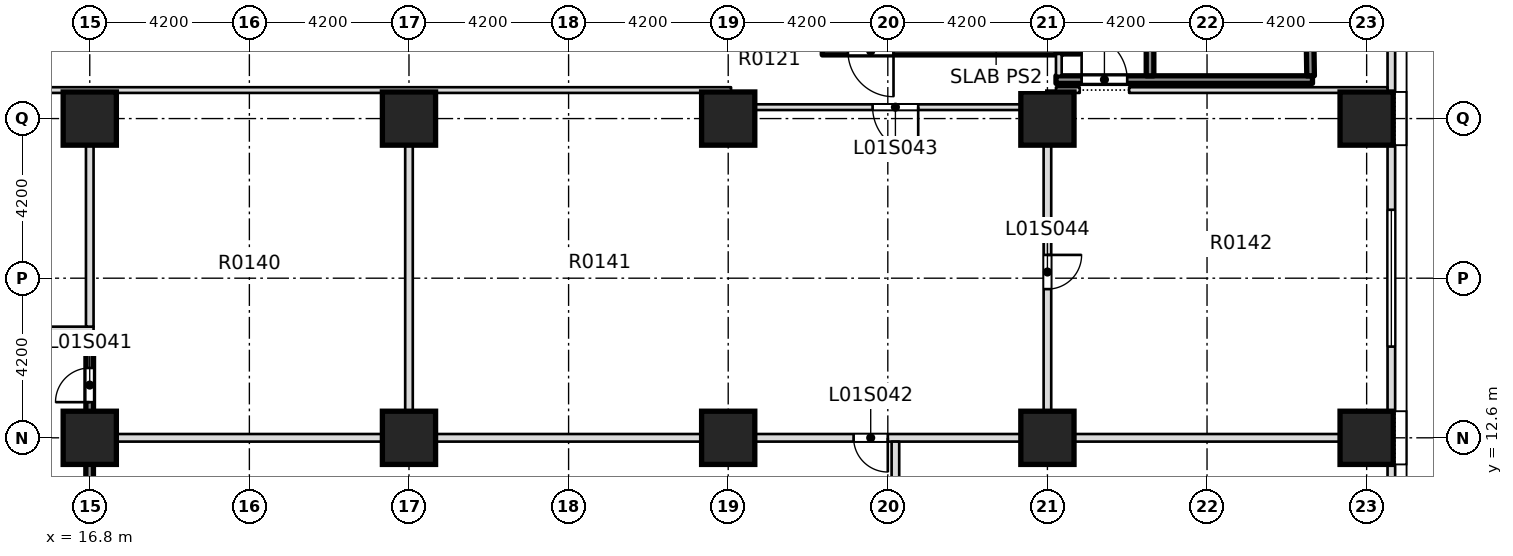
"""IFC4 building model, lengths in metres.
Left out: names, types, materials, properties, quantities, classifications, styles, units other than length and angle.
Written with IfcOpenShell. Run it as: python <this file> out.ifc"""

import sys

from ifc_helpers import new_model, si_unit, direction, frame, frame_2d, origin, origin_2d, place, context, subcontext, project, spatial, rectangle, extrude, element, fill, save


model = new_model("IFC4")
c1 = context("Model", 3, precision=1e-05, world=origin(), true_north=direction((0.0, 1.0)))
c2 = subcontext(c1, "Body", "Model", "MODEL_VIEW")
j1 = project(units=[si_unit("LENGTHUNIT", "METRE"), si_unit("PLANEANGLEUNIT", "RADIAN")], contexts=[c1])
p1 = place(None, origin())
s1 = spatial("IfcSite", under=j1, at=p1, CompositionType="ELEMENT")
p2 = place(p1, origin())
s2 = spatial("IfcBuilding", under=s1, at=p2, CompositionType="ELEMENT")
p3 = place(p2, frame((0.0, 0.0, 7.5)))
s3 = spatial("IfcBuildingStorey", under=s2, at=p3, CompositionType="ELEMENT", Elevation=7.5)
for number, where, z_axis, x_axis in (
    (1, (16.8, 12.6, -0.4), (0.0, 0.0, 1.0), (1.0, 0.0, 0.0)),
    (2, (25.2, 12.6, -0.4), (0.0, 0.0, 1.0), (1.0, 0.0, 0.0)),
    (3, (16.8, 21.0, -0.4), (0.0, 0.0, 1.0), (1.0, 0.0, 0.0)),
):
    element("IfcColumn", number, at=place(p3, frame(where, z_axis=z_axis, x_axis=x_axis)), inside=s3, PredefinedType="COLUMN", context=c2, shape_type="SweptSolid", body=[
        extrude(rectangle(XDim=1.4, YDim=1.4, at=origin_2d()), origin(), (0.0, 0.0, 1.0), 5.0),
    ])
for number, where, z_axis, x_axis in (
    (4, (33.6, 12.6, 0.0), (0.0, 0.0, 1.0), (1.0, 0.0, 0.0)),
    (5, (42.0, 12.6, 0.0), (0.0, 0.0, 1.0), (1.0, 0.0, 0.0)),
):
    element("IfcColumn", number, at=place(p3, frame(where, z_axis=z_axis, x_axis=x_axis)), inside=s3, PredefinedType="COLUMN", context=c2, shape_type="SweptSolid", body=[
        extrude(rectangle(XDim=1.4, YDim=1.4, at=origin_2d()), origin(), (0.0, 0.0, 1.0), 4.6),
    ])
for number, where, z_axis, x_axis in (
    (6, (50.4, 12.6, 0.0), (0.0, 0.0, 1.0), (1.0, 0.0, 0.0)),
    (7, (25.2, 21.0, 0.0), (0.0, 0.0, 1.0), (1.0, 0.0, 0.0)),
):
    element("IfcColumn", number, at=place(p3, frame(where, z_axis=z_axis, x_axis=x_axis)), inside=s3, PredefinedType="COLUMN", context=c2, shape_type="SweptSolid", body=[
        extrude(rectangle(XDim=1.4, YDim=1.4, at=origin_2d()), origin(), (0.0, 0.0, 1.0), 5.0),
    ])
for number, where, z_axis, x_axis in (
    (8, (33.6, 21.0, 0.0), (0.0, 0.0, 1.0), (1.0, 0.0, 0.0)),
    (9, (42.0, 21.0, 0.0), (0.0, 0.0, 1.0), (1.0, 0.0, 0.0)),
):
    element("IfcColumn", number, at=place(p3, frame(where, z_axis=z_axis, x_axis=x_axis)), inside=s3, PredefinedType="COLUMN", context=c2, shape_type="SweptSolid", body=[
        extrude(rectangle(XDim=1.4, YDim=1.4, at=origin_2d()), origin(), (0.0, 0.0, 1.0), 4.6),
    ])
p4 = place(p3, frame((50.4, 21.0, 0.0), z_axis=(0.0, 0.0, 1.0), x_axis=(1.0, 0.0, 0.0)))
e10 = element("IfcColumn", 10, at=p4, inside=s3, PredefinedType="COLUMN", context=c2, shape_type="SweptSolid", body=[
    extrude(rectangle(XDim=1.4, YDim=1.4, at=origin_2d()), origin(), (0.0, 0.0, 1.0), 5.0),
])
p5 = place(p3, frame((16.875, 12.6, 0.0), z_axis=(0.0, 0.0, 1.0), x_axis=(1.0, 0.0, 0.0)))
e11 = element("IfcWall", 11, at=p5, inside=s3, PredefinedType="PARTITIONING", context=c2, shape_type="SweptSolid", body=[
    extrude(rectangle(XDim=34.075, YDim=0.2, at=frame_2d((17.038, 0.0))), origin(), (0.0, 0.0, 1.0), 4.6),
])
p6 = place(p5, frame((20.025, 0.0, 0.0)))
e12 = element("IfcOpeningElement", 12, at=p6, cuts=e11, PredefinedType="OPENING", context=c2, shape_type="SweptSolid", body=[
    extrude(rectangle(XDim=0.9, YDim=2.1, at=frame_2d((0.45, 1.05))), frame((0.0, 0.11, 0.0), z_axis=(0.0, -1.0, 0.0), x_axis=(1.0, 0.0, 0.0)), (0.0, 0.0, 1.0), 0.22),
])
p7 = place(p3, frame((12.601, 15.45, 0.0), z_axis=(0.0, 0.0, 1.0), x_axis=(1.0, 0.0, 0.0)))
e13 = element("IfcWall", 13, at=p7, inside=s3, PredefinedType="PARTITIONING", context=c2, shape_type="SweptSolid", body=[
    extrude(rectangle(XDim=4.299, YDim=0.15, at=frame_2d((2.149, 0.0))), origin(), (0.0, 0.0, 1.0), 4.6),
])
p8 = place(p7, frame((1.549, 0.0, 0.0)))
e14 = element("IfcOpeningElement", 14, at=p8, cuts=e13, PredefinedType="OPENING", context=c2, shape_type="SweptSolid", body=[
    extrude(rectangle(XDim=1.1, YDim=2.1, at=frame_2d((0.55, 1.05))), frame((0.0, 0.085, 0.0), z_axis=(0.0, -1.0, 0.0), x_axis=(1.0, 0.0, 0.0)), (0.0, 0.0, 1.0), 0.17),
])
p9 = place(p3, frame((33.525, 21.3, 0.0), z_axis=(0.0, 0.0, 1.0), x_axis=(1.0, 0.0, 0.0)))
e15 = element("IfcWall", 15, at=p9, inside=s3, PredefinedType="PARTITIONING", context=c2, shape_type="SweptSolid", body=[
    extrude(rectangle(XDim=8.85, YDim=0.15, at=frame_2d((4.425, 0.0))), origin(), (0.0, 0.0, 1.0), 4.6),
])
p10 = place(p9, frame((3.875, 0.0, 0.0)))
e16 = element("IfcOpeningElement", 16, at=p10, cuts=e15, PredefinedType="OPENING", context=c2, shape_type="SweptSolid", body=[
    extrude(rectangle(XDim=1.2, YDim=2.1, at=frame_2d((0.6, 1.05))), frame((0.0, 0.085, 0.0), z_axis=(0.0, -1.0, 0.0), x_axis=(1.0, 0.0, 0.0)), (0.0, 0.0, 1.0), 0.17),
])
p11 = place(p3, frame((12.601, 21.75, 0.0), z_axis=(0.0, 0.0, 1.0), x_axis=(1.0, 0.0, 0.0)))
e17 = element("IfcWall", 17, at=p11, inside=s3, PredefinedType="PARTITIONING", context=c2, shape_type="SweptSolid", body=[
    extrude(rectangle(XDim=21.074, YDim=0.15, at=frame_2d((10.537, 0.0))), origin(), (0.0, 0.0, 1.0), 4.6),
])
p12 = place(p3, frame((42.225, 21.75, 0.0), z_axis=(0.0, 0.0, 1.0), x_axis=(1.0, 0.0, 0.0)))
e18 = element("IfcWall", 18, at=p12, inside=s3, PredefinedType="PARTITIONING", context=c2, shape_type="SweptSolid", body=[
    extrude(rectangle(XDim=0.625, YDim=0.15, at=frame_2d((0.312, 0.0))), origin(), (0.0, 0.0, 1.0), 4.6),
])
p13 = place(p3, frame((42.225, 22.025, 0.0), z_axis=(0.0, 0.0, 1.0), x_axis=(1.0, 0.0, 0.0)))
e19 = element("IfcWall", 19, at=p13, inside=s3, PredefinedType="SOLIDWALL", context=c2, shape_type="SweptSolid", body=[
    extrude(rectangle(XDim=6.75, YDim=0.2, at=frame_2d((3.375, 0.0))), origin(), (0.0, 0.0, 1.0), 4.6),
])
p14 = place(p13, frame((0.675, 0.0, 0.0)))
e20 = element("IfcOpeningElement", 20, at=p14, cuts=e19, PredefinedType="OPENING", context=c2, shape_type="SweptSolid", body=[
    extrude(rectangle(XDim=1.2, YDim=2.1, at=frame_2d((0.6, 1.05))), frame((0.0, 0.11, 0.0), z_axis=(0.0, -1.0, 0.0), x_axis=(1.0, 0.0, 0.0)), (0.0, 0.0, 1.0), 0.22),
])
p15 = place(p3, frame((36.075, 22.775, 0.0), z_axis=(0.0, 0.0, 1.0), x_axis=(1.0, 0.0, 0.0)))
e21 = element("IfcWall", 21, at=p15, inside=s3, PredefinedType="SOLIDWALL", context=c2, shape_type="SweptSolid", body=[
    extrude(rectangle(XDim=6.3, YDim=0.2, at=frame_2d((3.15, 0.0))), origin(), (0.0, 0.0, 1.0), 4.6),
])
p16 = place(p15, frame((0.675, 0.0, 0.0)))
e22 = element("IfcOpeningElement", 22, at=p16, cuts=e21, PredefinedType="OPENING", context=c2, shape_type="SweptSolid", body=[
    extrude(rectangle(XDim=1.2, YDim=2.1, at=frame_2d((0.6, 1.05))), frame((0.0, 0.11, 0.0), z_axis=(0.0, -1.0, 0.0), x_axis=(1.0, 0.0, 0.0)), (0.0, 0.0, 1.0), 0.22),
])
p17 = place(p3, frame((42.225, 22.8, 0.0), z_axis=(0.0, 0.0, 1.0), x_axis=(1.0, 0.0, 0.0)))
e23 = element("IfcWall", 23, at=p17, inside=s3, PredefinedType="SOLIDWALL", context=c2, shape_type="SweptSolid", body=[
    extrude(rectangle(XDim=0.625, YDim=0.2, at=frame_2d((0.312, 0.0))), origin(), (0.0, 0.0, 1.0), 4.6),
])
p18 = place(p3, frame((16.8, 15.525, 0.0), z_axis=(0.0, 0.0, 1.0), x_axis=(0.0, 1.0, 0.0)))
e24 = element("IfcWall", 24, at=p18, inside=s3, PredefinedType="PARTITIONING", context=c2, shape_type="SweptSolid", body=[
    extrude(rectangle(XDim=6.15, YDim=0.2, at=frame_2d((3.075, 0.0))), origin(), (0.0, 0.0, 1.0), 4.6),
])
p19 = place(p3, frame((25.2, 12.7, 0.0), z_axis=(0.0, 0.0, 1.0), x_axis=(0.0, 1.0, 0.0)))
e25 = element("IfcWall", 25, at=p19, inside=s3, PredefinedType="PARTITIONING", context=c2, shape_type="SweptSolid", body=[
    extrude(rectangle(XDim=8.975, YDim=0.2, at=frame_2d((4.488, 0.0))), origin(), (0.0, 0.0, 1.0), 4.6),
])
p20 = place(p3, frame((33.6, 21.375, 0.0), z_axis=(0.0, 0.0, 1.0), x_axis=(0.0, 1.0, 0.0)))
e26 = element("IfcWall", 26, at=p20, inside=s3, PredefinedType="PARTITIONING", context=c2, shape_type="SweptSolid", body=[
    extrude(rectangle(XDim=0.3, YDim=0.15, at=frame_2d((0.15, 0.0))), origin(), (0.0, 0.0, 1.0), 4.6),
])
p21 = place(p3, frame((38.0, -11.8, 0.0), z_axis=(0.0, 0.0, 1.0), x_axis=(0.0, 1.0, 0.0)))
e27 = element("IfcWall", 27, at=p21, inside=s3, PredefinedType="PARTITIONING", context=c2, shape_type="SweptSolid", body=[
    extrude(rectangle(XDim=24.3, YDim=0.2, at=frame_2d((12.15, 0.0))), origin(), (0.0, 0.0, 1.0), 4.6),
])
p22 = place(p21, frame((11.7, 0.0, 0.0)))
e28 = element("IfcOpeningElement", 28, at=p22, cuts=e27, PredefinedType="OPENING", context=c2, shape_type="SweptSolid", body=[
    extrude(rectangle(XDim=0.9, YDim=2.1, at=frame_2d((0.45, 1.05))), frame((0.0, 0.11, 0.0), z_axis=(0.0, -1.0, 0.0), x_axis=(1.0, 0.0, 0.0)), (0.0, 0.0, 1.0), 0.22),
])
p23 = place(p21, frame((12.75, 0.0, 0.0)))
e29 = element("IfcOpeningElement", 29, at=p23, cuts=e27, PredefinedType="OPENING", context=c2, shape_type="SweptSolid", body=[
    extrude(rectangle(XDim=0.9, YDim=2.1, at=frame_2d((0.45, 1.05))), frame((0.0, 0.11, 0.0), z_axis=(0.0, -1.0, 0.0), x_axis=(1.0, 0.0, 0.0)), (0.0, 0.0, 1.0), 0.22),
])
p24 = place(p3, frame((42.0, 12.7, 0.0), z_axis=(0.0, 0.0, 1.0), x_axis=(0.0, 1.0, 0.0)))
e30 = element("IfcWall", 30, at=p24, inside=s3, PredefinedType="PARTITIONING", context=c2, shape_type="SweptSolid", body=[
    extrude(rectangle(XDim=8.525, YDim=0.2, at=frame_2d((4.263, 0.0))), origin(), (0.0, 0.0, 1.0), 4.6),
])
p25 = place(p24, frame((3.812, 0.0, 0.0)))
e31 = element("IfcOpeningElement", 31, at=p25, cuts=e30, PredefinedType="OPENING", context=c2, shape_type="SweptSolid", body=[
    extrude(rectangle(XDim=0.9, YDim=2.1, at=frame_2d((0.45, 1.05))), frame((0.0, 0.11, 0.0), z_axis=(0.0, -1.0, 0.0), x_axis=(1.0, 0.0, 0.0)), (0.0, 0.0, 1.0), 0.22),
])
p26 = place(p3, frame((42.3, 21.375, 0.0), z_axis=(0.0, 0.0, 1.0), x_axis=(0.0, 1.0, 0.0)))
e32 = element("IfcWall", 32, at=p26, inside=s3, PredefinedType="PARTITIONING", context=c2, shape_type="SweptSolid", body=[
    extrude(rectangle(XDim=0.3, YDim=0.15, at=frame_2d((0.15, 0.0))), origin(), (0.0, 0.0, 1.0), 4.6),
])
p27 = place(p3, frame((42.3, 22.125, 0.0), z_axis=(0.0, 0.0, 1.0), x_axis=(0.0, 1.0, 0.0)))
e33 = element("IfcWall", 33, at=p27, inside=s3, PredefinedType="PARTITIONING", context=c2, shape_type="SweptSolid", body=[
    extrude(rectangle(XDim=0.575, YDim=0.15, at=frame_2d((0.288, 0.0))), origin(), (0.0, 0.0, 1.0), 4.6),
])
p28 = place(p3, frame((44.7, 22.125, 0.0), z_axis=(0.0, 0.0, 1.0), x_axis=(0.0, 1.0, 0.0)))
e34 = element("IfcWall", 34, at=p28, inside=s3, PredefinedType="SOLIDWALL", context=c2, shape_type="SweptSolid", body=[
    extrude(rectangle(XDim=6.225, YDim=0.2, at=frame_2d((3.113, 0.0))), origin(), (0.0, 0.0, 1.0), 4.6),
])
p29 = place(p28, frame((4.775, 0.0, 0.0)))
e35 = element("IfcOpeningElement", 35, at=p29, cuts=e34, PredefinedType="OPENING", context=c2, shape_type="SweptSolid", body=[
    extrude(rectangle(XDim=1.2, YDim=2.1, at=frame_2d((0.6, 1.05))), frame((0.0, 0.11, 0.0), z_axis=(0.0, -1.0, 0.0), x_axis=(1.0, 0.0, 0.0)), (0.0, 0.0, 1.0), 0.22),
])
p30 = place(p3, frame((48.925, 22.125, 0.0), z_axis=(0.0, 0.0, 1.0), x_axis=(-0.014867161329, 0.999889477649, 0.0)))
e36 = element("IfcWall", 36, at=p30, inside=s3, PredefinedType="SOLIDWALL", context=c2, shape_type="SweptSolid", body=[
    extrude(rectangle(XDim=1.675, YDim=0.2, at=frame_2d((0.837, 0.0))), origin(), (0.0, 0.0, 1.0), 4.6),
])
p31 = place(p3, frame((51.05, 4.9, 0.0), z_axis=(0.0, 0.0, 1.0), x_axis=(0.0, 1.0, 0.0)))
e37 = element("IfcWall", 37, at=p31, inside=s3, PredefinedType="STANDARD", context=c2, shape_type="SweptSolid", body=[
    extrude(rectangle(XDim=7.0, YDim=0.2, at=frame_2d((3.5, 0.0))), origin(), (0.0, 0.0, 1.0), 4.6),
])
p32 = place(p31, frame((1.7, 0.0, 0.9)))
e38 = element("IfcOpeningElement", 38, at=p32, cuts=e37, PredefinedType="OPENING", context=c2, shape_type="SweptSolid", body=[
    extrude(rectangle(XDim=3.6, YDim=2.8, at=frame_2d((1.8, 1.4))), frame((0.0, 0.11, 0.0), z_axis=(0.0, -1.0, 0.0), x_axis=(1.0, 0.0, 0.0)), (0.0, 0.0, 1.0), 0.22),
])
p33 = place(p3, frame((51.05, 13.3, 0.0), z_axis=(0.0, 0.0, 1.0), x_axis=(0.0, 1.0, 0.0)))
e39 = element("IfcWall", 39, at=p33, inside=s3, PredefinedType="STANDARD", context=c2, shape_type="SweptSolid", body=[
    extrude(rectangle(XDim=7.0, YDim=0.2, at=frame_2d((3.5, 0.0))), origin(), (0.0, 0.0, 1.0), 4.6),
])
p34 = place(p33, frame((1.7, 0.0, 0.9)))
e40 = element("IfcOpeningElement", 40, at=p34, cuts=e39, PredefinedType="OPENING", context=c2, shape_type="SweptSolid", body=[
    extrude(rectangle(XDim=3.6, YDim=2.8, at=frame_2d((1.8, 1.4))), frame((0.0, 0.11, 0.0), z_axis=(0.0, -1.0, 0.0), x_axis=(1.0, 0.0, 0.0)), (0.0, 0.0, 1.0), 0.22),
])
p35 = place(p3, frame((51.05, 21.7, 0.0), z_axis=(0.0, 0.0, 1.0), x_axis=(0.0, 1.0, 0.0)))
e41 = element("IfcWall", 41, at=p35, inside=s3, PredefinedType="STANDARD", context=c2, shape_type="SweptSolid", body=[
    extrude(rectangle(XDim=7.0, YDim=0.2, at=frame_2d((3.5, 0.0))), origin(), (0.0, 0.0, 1.0), 4.6),
])
p36 = place(p35, frame((2.37, 0.0, 0.9)))
e42 = element("IfcOpeningElement", 42, at=p36, cuts=e41, PredefinedType="OPENING", context=c2, shape_type="SweptSolid", body=[
    extrude(rectangle(XDim=3.6, YDim=2.8, at=frame_2d((1.8, 1.4))), frame((0.0, 0.11, 0.0), z_axis=(0.0, -1.0, 0.0), x_axis=(1.0, 0.0, 0.0)), (0.0, 0.0, 1.0), 0.22),
])
p37 = place(p3, frame((16.789, 3.3, 0.0), z_axis=(0.0, 0.0, 1.0), x_axis=(0.000891463876, 0.999999602646, 0.0)))
e43 = element("IfcWall", 43, at=p37, inside=s3, PredefinedType="SOLIDWALL", context=c2, shape_type="SweptSolid", body=[
    extrude(rectangle(XDim=12.05, YDim=0.2, at=frame_2d((6.025, 0.0))), origin(), (0.0, 0.0, 1.0), 4.6),
])
p38 = place(p37, frame((0.4, 0.0, 0.0)))
e44 = element("IfcOpeningElement", 44, at=p38, cuts=e43, PredefinedType="OPENING", context=c2, shape_type="SweptSolid", body=[
    extrude(rectangle(XDim=1.5, YDim=2.1, at=frame_2d((0.75, 1.05))), frame((0.0, 0.11, 0.0), z_axis=(0.0, -1.0, 0.0), x_axis=(1.0, 0.0, 0.0)), (0.0, 0.0, 1.0), 0.22),
])
p39 = place(p37, frame((10.238, 0.0, 0.0)))
e45 = element("IfcOpeningElement", 45, at=p39, cuts=e43, PredefinedType="OPENING", context=c2, shape_type="SweptSolid", body=[
    extrude(rectangle(XDim=0.9, YDim=2.1, at=frame_2d((0.45, 1.05))), frame((0.0, 0.11, 0.0), z_axis=(0.0, -1.0, 0.0), x_axis=(1.0, 0.0, 0.0)), (0.0, 0.0, 1.0), 0.22),
])
p40 = place(p3, frame((44.15, 21.75, 0.0), z_axis=(0.0, 0.0, 1.0), x_axis=(1.0, 0.0, 0.0)))
e46 = element("IfcWall", 46, at=p40, inside=s3, PredefinedType="PARTITIONING", context=c2, shape_type="SweptSolid", body=[
    extrude(rectangle(XDim=6.8, YDim=0.15, at=frame_2d((3.4, 0.0))), origin(), (0.0, 0.0, 1.0), 4.6),
])
p41 = place(p14, origin())
e47 = element("IfcDoor", 47, at=p41, inside=s3, OperationType="SINGLE_SWING_LEFT", PredefinedType="DOOR", context=c2, shape_type="SweptSolid", body=[
    extrude(rectangle(XDim=1.2, YDim=2.1, at=frame_2d((0.6, 1.05))), frame((0.0, 0.025, 0.0), z_axis=(0.0, -1.0, 0.0), x_axis=(1.0, 0.0, 0.0)), (0.0, 0.0, 1.0), 0.05),
])
fill(e20, e47)
p42 = place(p39, origin())
e48 = element("IfcDoor", 48, at=p42, inside=s3, OperationType="SINGLE_SWING_LEFT", PredefinedType="DOOR", context=c2, shape_type="SweptSolid", body=[
    extrude(rectangle(XDim=0.9, YDim=2.1, at=frame_2d((0.45, 1.05))), frame((0.0, 0.025, 0.0), z_axis=(0.0, -1.0, 0.0), x_axis=(1.0, 0.0, 0.0)), (0.0, 0.0, 1.0), 0.05),
])
fill(e45, e48)
p43 = place(p6, origin())
e49 = element("IfcDoor", 49, at=p43, inside=s3, OperationType="SINGLE_SWING_RIGHT", PredefinedType="DOOR", context=c2, shape_type="SweptSolid", body=[
    extrude(rectangle(XDim=0.9, YDim=2.1, at=frame_2d((0.45, 1.05))), frame((0.0, 0.025, 0.0), z_axis=(0.0, -1.0, 0.0), x_axis=(1.0, 0.0, 0.0)), (0.0, 0.0, 1.0), 0.05),
])
fill(e12, e49)
p44 = place(p10, origin())
e50 = element("IfcDoor", 50, at=p44, inside=s3, OperationType="SINGLE_SWING_RIGHT", PredefinedType="DOOR", context=c2, shape_type="SweptSolid", body=[
    extrude(rectangle(XDim=1.2, YDim=2.1, at=frame_2d((0.6, 1.05))), frame((0.0, 0.025, 0.0), z_axis=(0.0, -1.0, 0.0), x_axis=(1.0, 0.0, 0.0)), (0.0, 0.0, 1.0), 0.05),
])
fill(e16, e50)
p45 = place(p25, origin())
e51 = element("IfcDoor", 51, at=p45, inside=s3, OperationType="SINGLE_SWING_RIGHT", PredefinedType="DOOR", context=c2, shape_type="SweptSolid", body=[
    extrude(rectangle(XDim=0.9, YDim=2.1, at=frame_2d((0.45, 1.05))), frame((0.0, 0.025, 0.0), z_axis=(0.0, -1.0, 0.0), x_axis=(1.0, 0.0, 0.0)), (0.0, 0.0, 1.0), 0.05),
])
fill(e31, e51)
p46 = place(p34, origin())
e52 = element("IfcWindow", 52, at=p46, inside=s3, PartitioningType="SINGLE_PANEL", PredefinedType="WINDOW", context=c2, shape_type="SweptSolid", body=[
    extrude(rectangle(XDim=3.6, YDim=2.8, at=frame_2d((1.8, 1.4))), frame((0.0, 0.03, 0.0), z_axis=(0.0, -1.0, 0.0), x_axis=(1.0, 0.0, 0.0)), (0.0, 0.0, 1.0), 0.06),
])
fill(e40, e52)
save(model, sys.argv[1])
